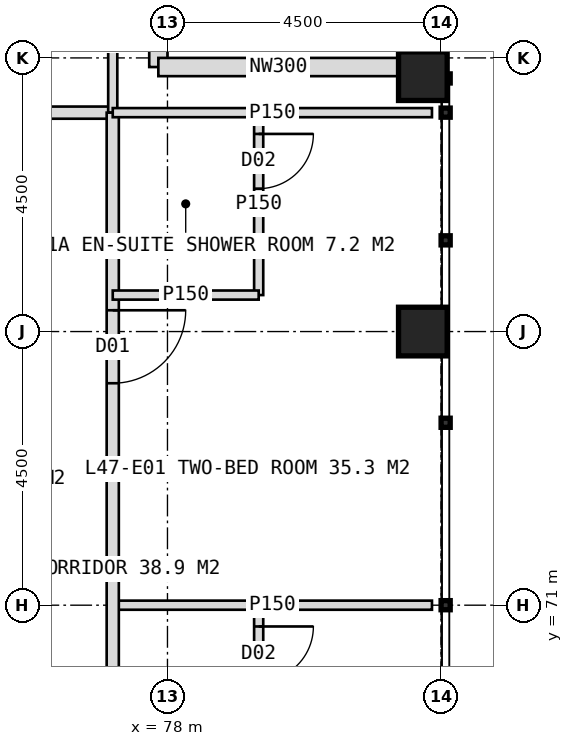
"""IFC4 building model, lengths in metres.
Left out: names, types, materials, properties, quantities, classifications, styles, units other than length and angle.
Written with IfcOpenShell. Run it as: python <this file> out.ifc"""

import sys

from ifc_helpers import new_model, si_unit, direction, frame, frame_2d, origin, origin_2d, place, context, subcontext, project, spatial, rectangle, hollow_rectangle, extrude, element, fill, save


model = new_model("IFC4")
c1 = context("Model", 3, precision=1e-05, world=origin(), true_north=direction((0.0, 1.0)))
c2 = subcontext(c1, "Body", "Model", "MODEL_VIEW")
j1 = project(units=[si_unit("LENGTHUNIT", "METRE"), si_unit("PLANEANGLEUNIT", "RADIAN")], contexts=[c1])
p1 = place(None, origin())
s1 = spatial("IfcSite", under=j1, at=p1, CompositionType="ELEMENT")
p2 = place(p1, origin())
s2 = spatial("IfcBuilding", under=s1, at=p2, CompositionType="ELEMENT")
p3 = place(p2, frame((0.0, 0.0, 197.0)))
s3 = spatial("IfcBuildingStorey", under=s2, at=p3, CompositionType="ELEMENT", Elevation=197.0)
for number, where, z_axis, x_axis in (
    (1, (82.2, 75.5, 0.0), (0.0, 0.0, 1.0), (1.0, 0.0, 0.0)),
    (2, (82.2, 79.7, 0.0), (0.0, 0.0, 1.0), (1.0, 0.0, 0.0)),
):
    element("IfcColumn", number, at=place(p3, frame(where, z_axis=z_axis, x_axis=x_axis)), inside=s3, PredefinedType="COLUMN", context=c2, shape_type="SweptSolid", body=[
        extrude(hollow_rectangle(XDim=0.8, YDim=0.8, WallThickness=0.08, at=origin_2d()), origin(), (0.0, 0.0, 1.0), 4.0),
    ])
for number, where, z_axis, x_axis in (
    (3, (77.85, 83.8, 0.0), (0.0, 0.0, 1.0), (0.0, -1.0, 0.0)),
    (4, (77.85, 79.85, 0.0), (0.0, 0.0, 1.0), (1.0, 0.0, 0.0)),
):
    element("IfcWall", number, at=place(p3, frame(where, z_axis=z_axis, x_axis=x_axis)), inside=s3, PredefinedType="ELEMENTEDWALL", context=c2, shape_type="SweptSolid", body=[
        extrude(rectangle(XDim=3.95, YDim=0.3, at=frame_2d((1.975, 0.0))), origin(), (0.0, 0.0, 1.0), 2.85),
    ])
p4 = place(p3, frame((42.9, 79.1, 0.0), z_axis=(0.0, 0.0, 1.0), x_axis=(1.0, 0.0, 0.0)))
e5 = element("IfcWall", 5, at=p4, inside=s3, PredefinedType="PARTITIONING", context=c2, shape_type="SweptSolid", body=[
    extrude(rectangle(XDim=34.2, YDim=0.2, at=frame_2d((17.1, 0.0))), origin(), (0.0, 0.0, 1.0), 3.75),
])
p5 = place(p4, frame((3.25, 0.0, 0.0)))
e6 = element("IfcOpeningElement", 6, at=p5, cuts=e5, PredefinedType="OPENING", context=c2, shape_type="SweptSolid", body=[
    extrude(rectangle(XDim=1.2, YDim=2.2, at=frame_2d((0.6, 1.1))), frame((0.0, 0.11, 0.0), z_axis=(0.0, -1.0, 0.0), x_axis=(1.0, 0.0, 0.0)), (0.0, 0.0, 1.0), 0.22),
])
p6 = place(p4, frame((10.6, 0.0, 0.0)))
e7 = element("IfcOpeningElement", 7, at=p6, cuts=e5, PredefinedType="OPENING", context=c2, shape_type="SweptSolid", body=[
    extrude(rectangle(XDim=1.0, YDim=2.1, at=frame_2d((0.5, 1.05))), frame((0.0, 0.11, 0.0), z_axis=(0.0, -1.0, 0.0), x_axis=(1.0, 0.0, 0.0)), (0.0, 0.0, 1.0), 0.22),
])
p7 = place(p4, frame((17.35, 0.0, 0.0)))
e8 = element("IfcOpeningElement", 8, at=p7, cuts=e5, PredefinedType="OPENING", context=c2, shape_type="SweptSolid", body=[
    extrude(rectangle(XDim=1.2, YDim=2.2, at=frame_2d((0.6, 1.1))), frame((0.0, 0.11, 0.0), z_axis=(0.0, -1.0, 0.0), x_axis=(1.0, 0.0, 0.0)), (0.0, 0.0, 1.0), 0.22),
])
p8 = place(p4, frame((25.75, 0.0, 0.0)))
e9 = element("IfcOpeningElement", 9, at=p8, cuts=e5, PredefinedType="OPENING", context=c2, shape_type="SweptSolid", body=[
    extrude(rectangle(XDim=1.2, YDim=2.2, at=frame_2d((0.6, 1.1))), frame((0.0, 0.11, 0.0), z_axis=(0.0, -1.0, 0.0), x_axis=(1.0, 0.0, 0.0)), (0.0, 0.0, 1.0), 0.22),
])
p9 = place(p3, frame((77.1, 79.1, 0.0), z_axis=(0.0, 0.0, 1.0), x_axis=(0.0, 1.0, 0.0)))
e10 = element("IfcWall", 10, at=p9, inside=s3, PredefinedType="PARTITIONING", context=c2, shape_type="SweptSolid", body=[
    extrude(rectangle(XDim=2.4, YDim=0.15, at=frame_2d((1.2, 0.0))), origin(), (0.0, 0.0, 1.0), 3.75),
])
p10 = place(p3, frame((77.1, 71.0, 0.0), z_axis=(0.0, 0.0, 1.0), x_axis=(1.0, 0.0, 0.0)))
e11 = element("IfcWall", 11, at=p10, inside=s3, PredefinedType="PARTITIONING", context=c2, shape_type="SweptSolid", body=[
    extrude(rectangle(XDim=5.25, YDim=0.15, at=frame_2d((2.625, 0.0))), origin(), (0.0, 0.0, 1.0), 3.75),
])
p11 = place(p3, frame((77.1, 79.1, 0.0), z_axis=(0.0, 0.0, 1.0), x_axis=(0.0, -1.0, 0.0)))
e12 = element("IfcWall", 12, at=p11, inside=s3, PredefinedType="PARTITIONING", context=c2, shape_type="SweptSolid", body=[
    extrude(rectangle(XDim=34.2, YDim=0.2, at=frame_2d((17.1, 0.0))), origin(), (0.0, 0.0, 1.0), 3.75),
])
p12 = place(p11, frame((3.25, 0.0, 0.0)))
e13 = element("IfcOpeningElement", 13, at=p12, cuts=e12, PredefinedType="OPENING", context=c2, shape_type="SweptSolid", body=[
    extrude(rectangle(XDim=1.2, YDim=2.2, at=frame_2d((0.6, 1.1))), frame((0.0, 0.11, 0.0), z_axis=(0.0, -1.0, 0.0), x_axis=(1.0, 0.0, 0.0)), (0.0, 0.0, 1.0), 0.22),
])
p13 = place(p11, frame((11.35, 0.0, 0.0)))
e14 = element("IfcOpeningElement", 14, at=p13, cuts=e12, PredefinedType="OPENING", context=c2, shape_type="SweptSolid", body=[
    extrude(rectangle(XDim=1.2, YDim=2.2, at=frame_2d((0.6, 1.1))), frame((0.0, 0.11, 0.0), z_axis=(0.0, -1.0, 0.0), x_axis=(1.0, 0.0, 0.0)), (0.0, 0.0, 1.0), 0.22),
])
p14 = place(p11, frame((19.75, 0.0, 0.0)))
e15 = element("IfcOpeningElement", 15, at=p14, cuts=e12, PredefinedType="OPENING", context=c2, shape_type="SweptSolid", body=[
    extrude(rectangle(XDim=1.2, YDim=2.2, at=frame_2d((0.6, 1.1))), frame((0.0, 0.11, 0.0), z_axis=(0.0, -1.0, 0.0), x_axis=(1.0, 0.0, 0.0)), (0.0, 0.0, 1.0), 0.22),
])
p15 = place(p11, frame((25.75, 0.0, 0.0)))
e16 = element("IfcOpeningElement", 16, at=p15, cuts=e12, PredefinedType="OPENING", context=c2, shape_type="SweptSolid", body=[
    extrude(rectangle(XDim=1.2, YDim=2.2, at=frame_2d((0.6, 1.1))), frame((0.0, 0.11, 0.0), z_axis=(0.0, -1.0, 0.0), x_axis=(1.0, 0.0, 0.0)), (0.0, 0.0, 1.0), 0.22),
])
p16 = place(p3, frame((77.1, 79.1, 0.0), z_axis=(0.0, 0.0, 1.0), x_axis=(1.0, 0.0, 0.0)))
e17 = element("IfcWall", 17, at=p16, inside=s3, PredefinedType="PARTITIONING", context=c2, shape_type="SweptSolid", body=[
    extrude(rectangle(XDim=5.25, YDim=0.15, at=frame_2d((2.625, 0.0))), origin(), (0.0, 0.0, 1.0), 3.75),
])
p17 = place(p3, frame((79.5, 79.1, 0.0), z_axis=(0.0, 0.0, 1.0), x_axis=(0.0, -1.0, 0.0)))
e18 = element("IfcWall", 18, at=p17, inside=s3, PredefinedType="PARTITIONING", context=c2, shape_type="SweptSolid", body=[
    extrude(rectangle(XDim=3.0, YDim=0.15, at=frame_2d((1.5, 0.0))), origin(), (0.0, 0.0, 1.0), 3.75),
])
p18 = place(p17, frame((0.35, 0.0, 0.0)))
e19 = element("IfcOpeningElement", 19, at=p18, cuts=e18, PredefinedType="OPENING", context=c2, shape_type="SweptSolid", body=[
    extrude(rectangle(XDim=0.9, YDim=2.1, at=frame_2d((0.45, 1.05))), frame((0.0, 0.085, 0.0), z_axis=(0.0, -1.0, 0.0), x_axis=(1.0, 0.0, 0.0)), (0.0, 0.0, 1.0), 0.17),
])
p19 = place(p3, frame((77.1, 76.1, 0.0), z_axis=(0.0, 0.0, 1.0), x_axis=(1.0, 0.0, 0.0)))
e20 = element("IfcWall", 20, at=p19, inside=s3, PredefinedType="PARTITIONING", context=c2, shape_type="SweptSolid", body=[
    extrude(rectangle(XDim=2.4, YDim=0.15, at=frame_2d((1.2, 0.0))), origin(), (0.0, 0.0, 1.0), 3.75),
])
p20 = place(p3, frame((79.5, 71.0, 0.0), z_axis=(0.0, 0.0, 1.0), x_axis=(0.0, -1.0, 0.0)))
e21 = element("IfcWall", 21, at=p20, inside=s3, PredefinedType="PARTITIONING", context=c2, shape_type="SweptSolid", body=[
    extrude(rectangle(XDim=3.0, YDim=0.15, at=frame_2d((1.5, 0.0))), origin(), (0.0, 0.0, 1.0), 3.75),
])
p21 = place(p20, frame((0.35, 0.0, 0.0)))
e22 = element("IfcOpeningElement", 22, at=p21, cuts=e21, PredefinedType="OPENING", context=c2, shape_type="SweptSolid", body=[
    extrude(rectangle(XDim=0.9, YDim=2.1, at=frame_2d((0.45, 1.05))), frame((0.0, 0.085, 0.0), z_axis=(0.0, -1.0, 0.0), x_axis=(1.0, 0.0, 0.0)), (0.0, 0.0, 1.0), 0.17),
])
p22 = place(p12, origin())
e23 = element("IfcDoor", 23, at=p22, inside=s3, OperationType="SINGLE_SWING_LEFT", PredefinedType="DOOR", context=c2, shape_type="SweptSolid", body=[
    extrude(rectangle(XDim=1.2, YDim=2.2, at=frame_2d((0.6, 1.1))), frame((0.0, 0.025, 0.0), z_axis=(0.0, -1.0, 0.0), x_axis=(1.0, 0.0, 0.0)), (0.0, 0.0, 1.0), 0.05),
])
fill(e13, e23)
p23 = place(p18, origin())
e24 = element("IfcDoor", 24, at=p23, inside=s3, OperationType="SINGLE_SWING_LEFT", PredefinedType="DOOR", context=c2, shape_type="SweptSolid", body=[
    extrude(rectangle(XDim=0.9, YDim=2.1, at=frame_2d((0.45, 1.05))), frame((0.0, 0.025, 0.0), z_axis=(0.0, -1.0, 0.0), x_axis=(1.0, 0.0, 0.0)), (0.0, 0.0, 1.0), 0.05),
])
fill(e19, e24)
p24 = place(p21, origin())
e25 = element("IfcDoor", 25, at=p24, inside=s3, OperationType="SINGLE_SWING_LEFT", PredefinedType="DOOR", context=c2, shape_type="SweptSolid", body=[
    extrude(rectangle(XDim=0.9, YDim=2.1, at=frame_2d((0.45, 1.05))), frame((0.0, 0.025, 0.0), z_axis=(0.0, -1.0, 0.0), x_axis=(1.0, 0.0, 0.0)), (0.0, 0.0, 1.0), 0.05),
])
fill(e22, e25)
save(model, sys.argv[1])
